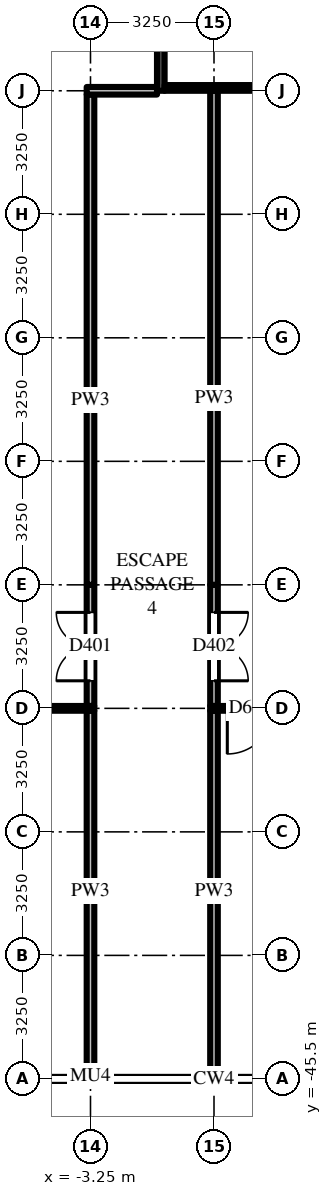
"""IFC4 building model, lengths in metres.
Left out: names, types, materials, properties, quantities, classifications, styles, units other than length and angle.
Written with IfcOpenShell. Run it as: python <this file> out.ifc"""

import sys

from ifc_helpers import new_model, si_unit, direction, frame, frame_2d, origin, place, context, subcontext, project, spatial, rectangle, extrude, source, transform, mapped, element, fill, save


model = new_model("IFC4")
c1 = context("Model", 3, precision=1e-05, world=origin(), true_north=direction((0.0, 1.0)))
c2 = subcontext(c1, "Body", "Model", "MODEL_VIEW")
j1 = project(units=[si_unit("LENGTHUNIT", "METRE"), si_unit("PLANEANGLEUNIT", "RADIAN")], contexts=[c1])
p1 = place(None, origin())
s1 = spatial("IfcSite", under=j1, at=p1, CompositionType="ELEMENT")
p2 = place(p1, origin())
s2 = spatial("IfcBuilding", under=s1, at=p2, CompositionType="ELEMENT")
p3 = place(p2, frame((0.0, 0.0, 8.0)))
s3 = spatial("IfcBuildingStorey", under=s2, at=p3, CompositionType="ELEMENT", Elevation=8.0)
m1 = source(origin(), c2, "Body", "SweptSolid", [
    extrude(rectangle(XDim=6.0, YDim=0.2, at=frame_2d((3.0, 0.0))), origin(), (0.0, 0.0, 1.0), 5.7),
])
p4 = place(p3, frame((-1.4, -13.5, 0.0), z_axis=(0.0, 0.0, 1.0), x_axis=(0.0, -1.0, 0.0)))
e1 = element("IfcWall", 1, at=p4, inside=s3, PredefinedType="SHEAR", context=c2, shape_type="MappedRepresentation", body=[
    mapped(m1, transform((0.0, 0.0, 0.0))),
])
m2 = source(origin(), c2, "Body", "SweptSolid", [
    extrude(rectangle(XDim=2.6, YDim=0.15, at=frame_2d((1.3, 0.0))), origin(), (0.0, 0.0, 1.0), 5.7),
])
p5 = place(p3, frame((1.3, -19.425, 0.0), z_axis=(0.0, 0.0, 1.0), x_axis=(-1.0, 0.0, 0.0)))
e2 = element("IfcWall", 2, at=p5, inside=s3, PredefinedType="SHEAR", context=c2, shape_type="MappedRepresentation", body=[
    mapped(m2, transform((0.0, 0.0, 0.0))),
])
m3 = source(origin(), c2, "Body", "SweptSolid", [
    extrude(rectangle(XDim=3.188, YDim=0.2, at=frame_2d((1.594, 0.0))), origin(), (0.0, 0.0, 1.0), 4.997),
])
p6 = place(p3, frame((-3.25, -35.688, 0.0), z_axis=(0.0, 0.0, 1.0), x_axis=(0.0, 1.0, 0.0)))
e3 = element("IfcWall", 3, at=p6, inside=s3, PredefinedType="PARTITIONING", context=c2, shape_type="MappedRepresentation", body=[
    mapped(m3, transform((0.0, 0.0, 0.0))),
])
m4 = source(origin(), c2, "Body", "SweptSolid", [
    extrude(rectangle(XDim=1.8, YDim=2.1, at=frame_2d((0.9, 1.05))), frame((0.0, 0.11, 0.0), z_axis=(0.0, -1.0, 0.0), x_axis=(1.0, 0.0, 0.0)), (0.0, 0.0, 1.0), 0.22),
])
p7 = place(p6, frame((0.663, 0.0, 0.0)))
e4 = element("IfcOpeningElement", 4, at=p7, cuts=e3, PredefinedType="OPENING", context=c2, shape_type="MappedRepresentation", body=[
    mapped(m4, transform((0.0, 0.0, 0.0))),
])
m5 = source(origin(), c2, "Body", "SweptSolid", [
    extrude(rectangle(XDim=9.488, YDim=0.2, at=frame_2d((4.744, 0.0))), origin(), (0.0, 0.0, 1.0), 4.918),
])
p8 = place(p3, frame((-3.25, -45.3, 0.0), z_axis=(0.0, 0.0, 1.0), x_axis=(0.0, 1.0, 0.0)))
e5 = element("IfcWall", 5, at=p8, inside=s3, PredefinedType="PARTITIONING", context=c2, shape_type="MappedRepresentation", body=[
    mapped(m5, transform((0.0, 0.0, 0.0))),
])
m6 = source(origin(), c2, "Body", "SweptSolid", [
    extrude(rectangle(XDim=12.9, YDim=0.2, at=frame_2d((6.45, 0.0))), origin(), (0.0, 0.0, 1.0), 4.918),
])
p9 = place(p3, frame((-3.25, -32.5, 0.0), z_axis=(0.0, 0.0, 1.0), x_axis=(0.0, 1.0, 0.0)))
e6 = element("IfcWall", 6, at=p9, inside=s3, PredefinedType="PARTITIONING", context=c2, shape_type="MappedRepresentation", body=[
    mapped(m6, transform((0.0, 0.0, 0.0))),
])
p10 = place(p3, frame((0.0, -32.5, 0.0), z_axis=(0.0, 0.0, 1.0), x_axis=(0.0, -1.0, 0.0)))
e7 = element("IfcWall", 7, at=p10, inside=s3, PredefinedType="PARTITIONING", context=c2, shape_type="MappedRepresentation", body=[
    mapped(m3, transform((0.0, 0.0, 0.0))),
])
p11 = place(p10, frame((0.725, 0.0, 0.0)))
e8 = element("IfcOpeningElement", 8, at=p11, cuts=e7, PredefinedType="OPENING", context=c2, shape_type="MappedRepresentation", body=[
    mapped(m4, transform((0.0, 0.0, 0.0))),
])
p12 = place(p3, frame((0.0, -35.812, 0.0), z_axis=(0.0, 0.0, 1.0), x_axis=(0.0, -1.0, 0.0)))
e9 = element("IfcWall", 9, at=p12, inside=s3, PredefinedType="PARTITIONING", context=c2, shape_type="MappedRepresentation", body=[
    mapped(m5, transform((0.0, 0.0, 0.0))),
])
m7 = source(origin(), c2, "Body", "SweptSolid", [
    extrude(rectangle(XDim=13.0, YDim=0.2, at=frame_2d((6.5, 0.0))), origin(), (0.0, 0.0, 1.0), 4.918),
])
p13 = place(p3, frame((0.0, -32.5, 0.0), z_axis=(0.0, 0.0, 1.0), x_axis=(0.0, 1.0, 0.0)))
e10 = element("IfcWall", 10, at=p13, inside=s3, PredefinedType="PARTITIONING", context=c2, shape_type="MappedRepresentation", body=[
    mapped(m7, transform((0.0, 0.0, 0.0))),
])
p14 = place(p3, frame((-3.15, -35.75, 0.0), z_axis=(0.0, 0.0, 1.0), x_axis=(-1.0, 0.0, 0.0)))
e11 = element("IfcWall", 11, at=p14, inside=s3, PredefinedType="PARTITIONING", context=c2, shape_type="SweptSolid", body=[
    extrude(rectangle(XDim=32.6, YDim=0.125, at=frame_2d((16.3, 0.0))), origin(), (0.0, 0.0, 1.0), 4.997),
])
m8 = source(origin(), c2, "Body", "SweptSolid", [
    extrude(rectangle(XDim=1.2, YDim=2.1, at=frame_2d((0.6, 1.05))), frame((0.0, 0.073, 0.0), z_axis=(0.0, -1.0, 0.0), x_axis=(1.0, 0.0, 0.0)), (0.0, 0.0, 1.0), 0.145),
])
p15 = place(p14, frame((31.05, 0.0, 0.0)))
e12 = element("IfcOpeningElement", 12, at=p15, cuts=e11, PredefinedType="OPENING", context=c2, shape_type="MappedRepresentation", body=[
    mapped(m8, transform((0.0, 0.0, 0.0))),
])
p16 = place(p14, frame((13.6, 0.0, 0.0)))
e13 = element("IfcOpeningElement", 13, at=p16, cuts=e11, PredefinedType="OPENING", context=c2, shape_type="MappedRepresentation", body=[
    mapped(m8, transform((0.0, 0.0, 0.0))),
])
p17 = place(p3, frame((35.75, -35.75, 0.0), z_axis=(0.0, 0.0, 1.0), x_axis=(-1.0, 0.0, 0.0)))
e14 = element("IfcWall", 14, at=p17, inside=s3, PredefinedType="PARTITIONING", context=c2, shape_type="SweptSolid", body=[
    extrude(rectangle(XDim=35.85, YDim=0.125, at=frame_2d((17.925, 0.0))), origin(), (0.0, 0.0, 1.0), 4.997),
])
p18 = place(p17, frame((34.2, 0.0, 0.0)))
e15 = element("IfcOpeningElement", 15, at=p18, cuts=e14, PredefinedType="OPENING", context=c2, shape_type="MappedRepresentation", body=[
    mapped(m8, transform((0.0, 0.0, 0.0))),
])
m9 = source(origin(), c2, "Body", "SweptSolid", [
    extrude(rectangle(XDim=1.0, YDim=2.1, at=frame_2d((0.5, 1.05))), frame((0.0, 0.073, 0.0), z_axis=(0.0, -1.0, 0.0), x_axis=(1.0, 0.0, 0.0)), (0.0, 0.0, 1.0), 0.145),
])
p19 = place(p17, frame((21.4, 0.0, 0.0)))
e16 = element("IfcOpeningElement", 16, at=p19, cuts=e14, PredefinedType="OPENING", context=c2, shape_type="MappedRepresentation", body=[
    mapped(m9, transform((0.0, 0.0, 0.0))),
])
p20 = place(p17, frame((3.15, 0.0, 0.0)))
e17 = element("IfcOpeningElement", 17, at=p20, cuts=e14, PredefinedType="OPENING", context=c2, shape_type="MappedRepresentation", body=[
    mapped(m8, transform((0.0, 0.0, 0.0))),
])
m10 = source(origin(), c2, "Body", "SweptSolid", [
    extrude(rectangle(XDim=1.85, YDim=0.2, at=frame_2d((0.925, 0.0))), origin(), (0.0, 0.0, 1.0), 4.997),
])
p21 = place(p3, frame((-3.35, -19.5, 0.0), z_axis=(0.0, 0.0, 1.0), x_axis=(1.0, 0.0, 0.0)))
e18 = element("IfcWall", 18, at=p21, inside=s3, PredefinedType="PARTITIONING", context=c2, shape_type="MappedRepresentation", body=[
    mapped(m10, transform((0.0, 0.0, 0.0))),
])
m11 = source(origin(), c2, "Body", "SweptSolid", [
    extrude(rectangle(XDim=1.2, YDim=2.1, at=frame_2d((0.6, 1.05))), frame((0.0, 0.025, 0.0), z_axis=(0.0, -1.0, 0.0), x_axis=(1.0, 0.0, 0.0)), (0.0, 0.0, 1.0), 0.05),
])
p22 = place(p18, origin())
e19 = element("IfcDoor", 19, at=p22, inside=s3, OperationType="SINGLE_SWING_RIGHT", PredefinedType="DOOR", context=c2, shape_type="MappedRepresentation", body=[
    mapped(m11, transform((0.0, 0.0, 0.0))),
])
fill(e15, e19)
m12 = source(origin(), c2, "Body", "SweptSolid", [
    extrude(rectangle(XDim=1.8, YDim=2.1, at=frame_2d((0.9, 1.05))), frame((0.0, 0.025, 0.0), z_axis=(0.0, -1.0, 0.0), x_axis=(1.0, 0.0, 0.0)), (0.0, 0.0, 1.0), 0.05),
])
p23 = place(p7, origin())
e20 = element("IfcDoor", 20, at=p23, inside=s3, OperationType="DOUBLE_DOOR_SINGLE_SWING", PredefinedType="DOOR", context=c2, shape_type="MappedRepresentation", body=[
    mapped(m12, transform((0.0, 0.0, 0.0))),
])
fill(e4, e20)
p24 = place(p11, origin())
e21 = element("IfcDoor", 21, at=p24, inside=s3, OperationType="DOUBLE_DOOR_SINGLE_SWING", PredefinedType="DOOR", context=c2, shape_type="MappedRepresentation", body=[
    mapped(m12, transform((0.0, 0.0, 0.0))),
])
fill(e8, e21)
save(model, sys.argv[1])
